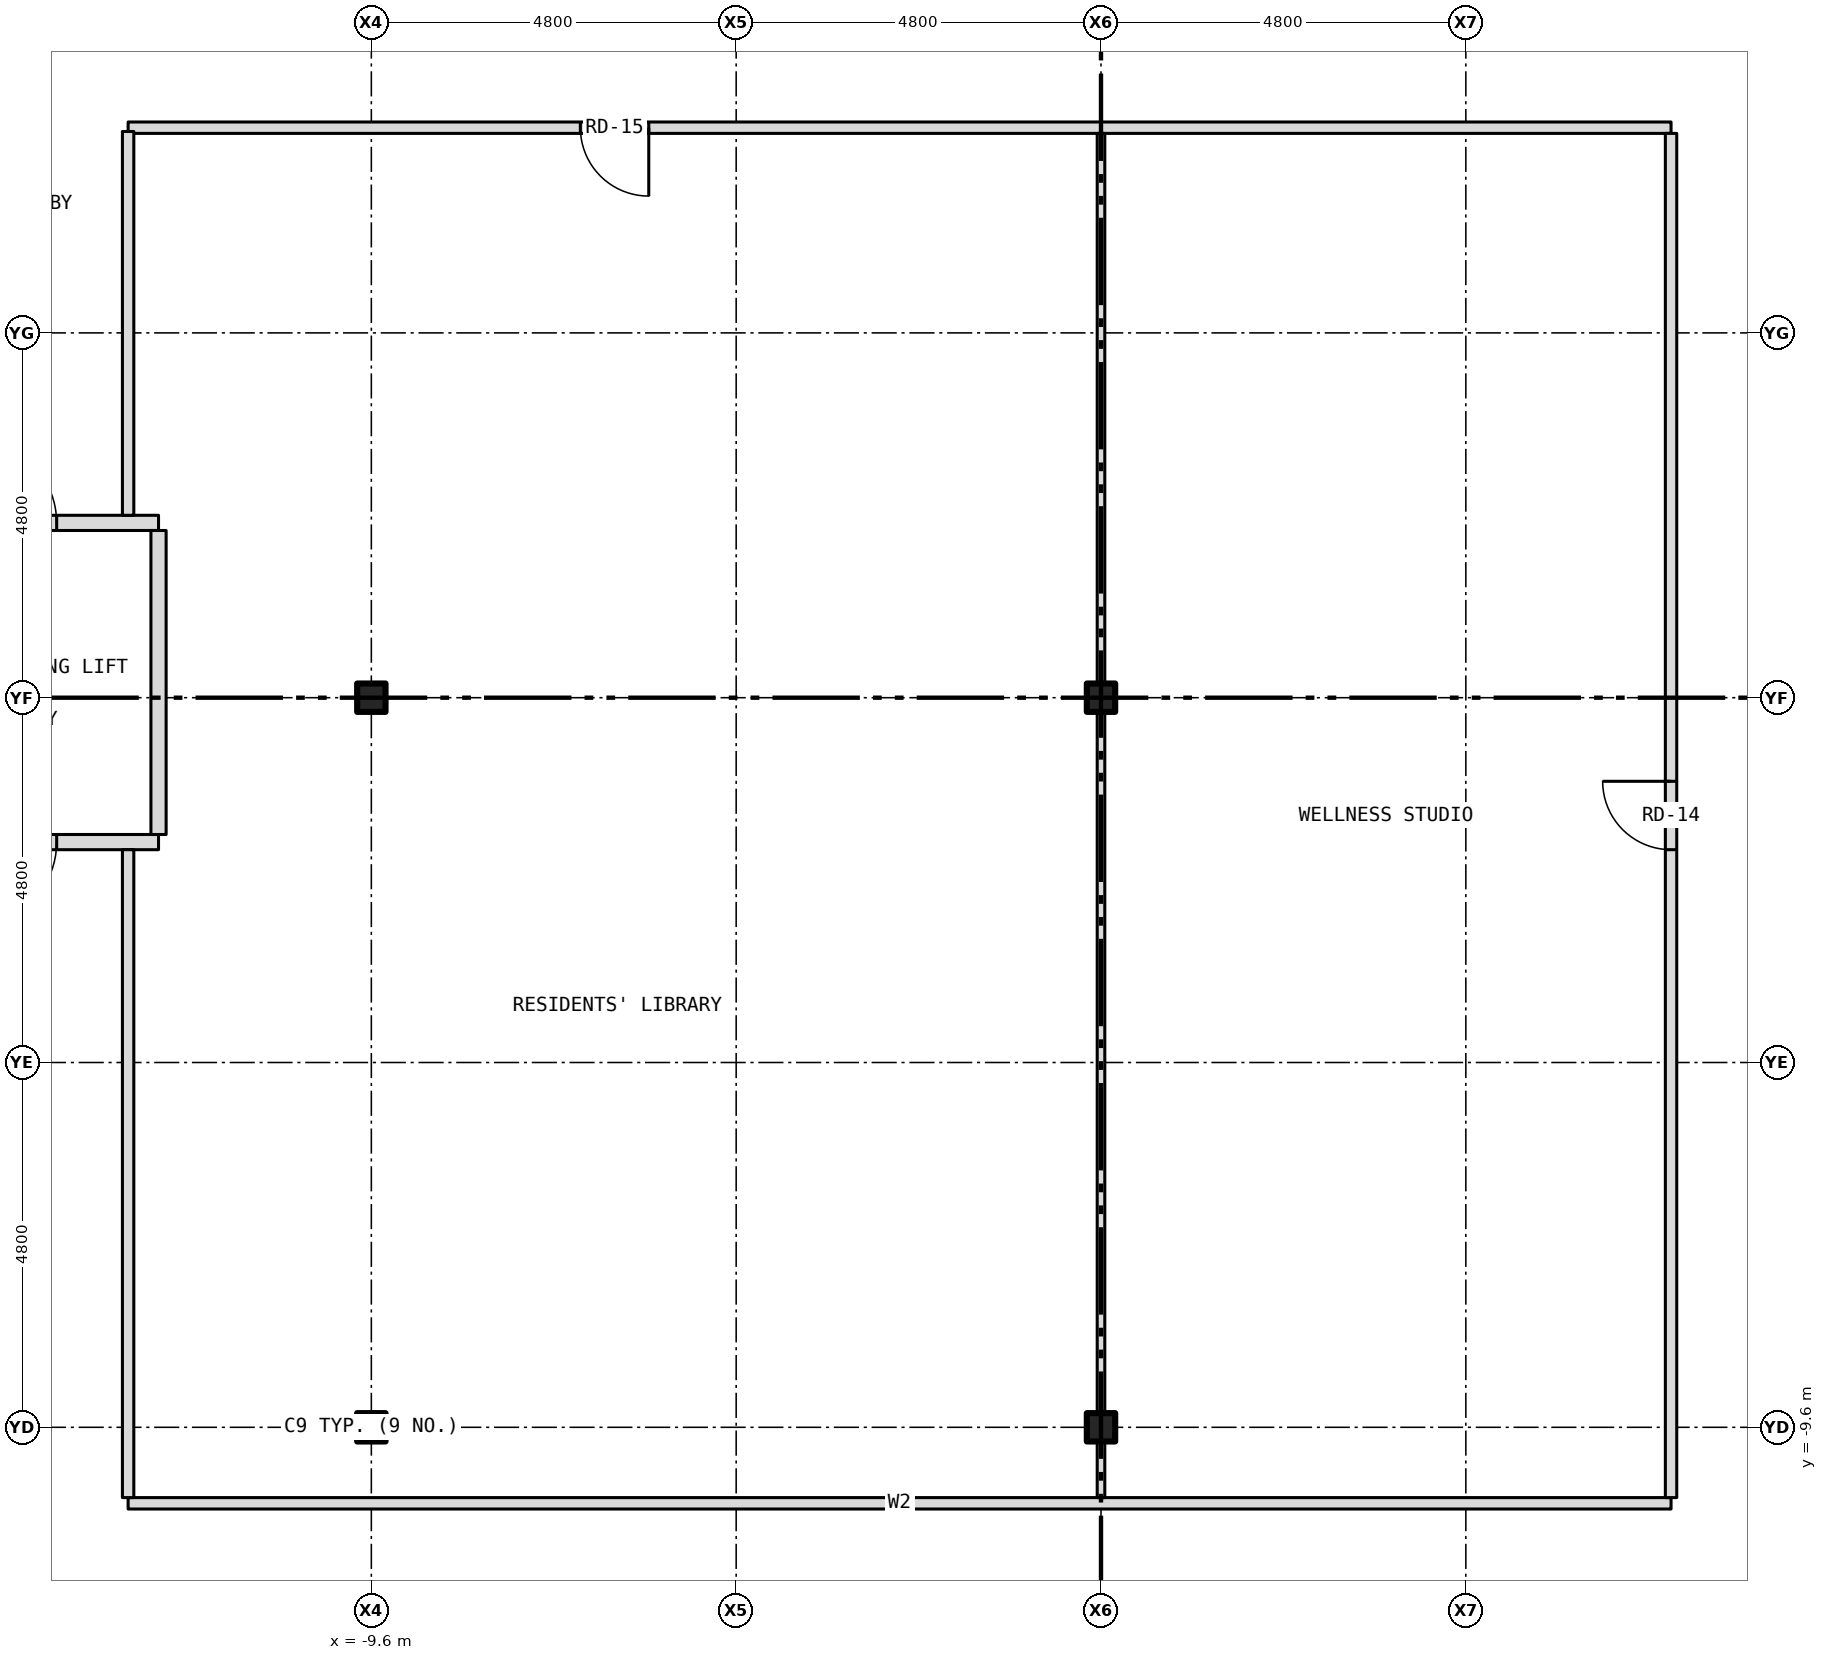
"""IFC4 building model, lengths in metres.
Left out: names, types, materials, properties, quantities, classifications, styles, units other than length and angle.
Written with IfcOpenShell. Run it as: python <this file> out.ifc"""

import sys

from ifc_helpers import new_model, si_unit, direction, frame, frame_2d, origin, origin_2d, place, context, subcontext, project, spatial, rectangle, i_section, extrude, element, fill, save


model = new_model("IFC4")
c1 = context("Model", 3, precision=1e-05, world=origin(), true_north=direction((0.0, 1.0)))
c2 = subcontext(c1, "Body", "Model", "MODEL_VIEW")
j1 = project(units=[si_unit("LENGTHUNIT", "METRE"), si_unit("PLANEANGLEUNIT", "RADIAN")], contexts=[c1])
p1 = place(None, origin())
s1 = spatial("IfcSite", under=j1, at=p1, CompositionType="ELEMENT")
p2 = place(p1, origin())
s2 = spatial("IfcBuilding", under=s1, at=p2, CompositionType="ELEMENT")
p3 = place(p2, frame((0.0, 0.0, 194.5)))
s3 = spatial("IfcBuildingStorey", under=s2, at=p3, CompositionType="ELEMENT", Elevation=194.5)
for number, where, z_axis, x_axis in (
    (1, (-9.6, -9.6, -0.15), (0.0, 0.0, 1.0), (1.0, 0.0, 0.0)),
    (2, (-9.6, 0.0, -0.15), (0.0, 0.0, 1.0), (1.0, 0.0, 0.0)),
    (3, (0.0, -9.6, -0.15), (0.0, 0.0, 1.0), (1.0, 0.0, 0.0)),
    (4, (0.0, 0.0, -0.15), (0.0, 0.0, 1.0), (1.0, 0.0, 0.0)),
):
    element("IfcColumn", number, at=place(p3, frame(where, z_axis=z_axis, x_axis=x_axis)), inside=s3, PredefinedType="COLUMN", context=c2, shape_type="SweptSolid", body=[
        extrude(i_section(OverallWidth=0.373, OverallDepth=0.373, WebThickness=0.016, FlangeThickness=0.026, at=origin_2d()), origin(), (0.0, 0.0, 1.0), 3.5),
    ])
p4 = place(p3, frame((-12.8, -10.6, 0.0), z_axis=(0.0, 0.0, 1.0), x_axis=(1.0, 0.0, 0.0)))
e5 = element("IfcWall", 5, at=p4, inside=s3, PredefinedType="PARTITIONING", context=c2, shape_type="SweptSolid", body=[
    extrude(rectangle(XDim=20.3, YDim=0.15, at=frame_2d((10.15, 0.0))), origin(), (0.0, 0.0, 1.0), 3.35),
])
p5 = place(p3, frame((-15.68, -1.9, 0.0), z_axis=(0.0, 0.0, 1.0), x_axis=(1.0, 0.0, 0.0)))
e6 = element("IfcWall", 6, at=p5, inside=s3, PredefinedType="PARTITIONING", context=c2, shape_type="SweptSolid", body=[
    extrude(rectangle(XDim=3.28, YDim=0.2, at=frame_2d((1.64, 0.0))), origin(), (0.0, 0.0, 1.0), 3.35),
])
p6 = place(p5, frame((0.84, 0.0, 0.0)))
e7 = element("IfcOpeningElement", 7, at=p6, cuts=e6, PredefinedType="OPENING", context=c2, shape_type="SweptSolid", body=[
    extrude(rectangle(XDim=1.1, YDim=2.1, at=frame_2d((0.55, 1.05))), frame((0.0, 0.112, 0.0), z_axis=(0.0, -1.0, 0.0), x_axis=(1.0, 0.0, 0.0)), (0.0, 0.0, 1.0), 0.224),
])
p7 = place(p3, frame((-15.68, 2.3, 0.0), z_axis=(0.0, 0.0, 1.0), x_axis=(1.0, 0.0, 0.0)))
e8 = element("IfcWall", 8, at=p7, inside=s3, PredefinedType="PARTITIONING", context=c2, shape_type="SweptSolid", body=[
    extrude(rectangle(XDim=3.28, YDim=0.2, at=frame_2d((1.64, 0.0))), origin(), (0.0, 0.0, 1.0), 3.35),
])
p8 = place(p7, frame((0.84, 0.0, 0.0)))
e9 = element("IfcOpeningElement", 9, at=p8, cuts=e8, PredefinedType="OPENING", context=c2, shape_type="SweptSolid", body=[
    extrude(rectangle(XDim=1.1, YDim=2.1, at=frame_2d((0.55, 1.05))), frame((0.0, 0.112, 0.0), z_axis=(0.0, -1.0, 0.0), x_axis=(1.0, 0.0, 0.0)), (0.0, 0.0, 1.0), 0.224),
])
p9 = place(p3, frame((-12.8, 7.5, 0.0), z_axis=(0.0, 0.0, 1.0), x_axis=(1.0, 0.0, 0.0)))
e10 = element("IfcWall", 10, at=p9, inside=s3, PredefinedType="PARTITIONING", context=c2, shape_type="SweptSolid", body=[
    extrude(rectangle(XDim=20.3, YDim=0.15, at=frame_2d((10.15, 0.0))), origin(), (0.0, 0.0, 1.0), 3.35),
])
p10 = place(p9, frame((5.95, 0.0, 0.0)))
e11 = element("IfcOpeningElement", 11, at=p10, cuts=e10, PredefinedType="OPENING", context=c2, shape_type="SweptSolid", body=[
    extrude(rectangle(XDim=0.9, YDim=2.1, at=frame_2d((0.45, 1.05))), frame((0.0, 0.087, 0.0), z_axis=(0.0, -1.0, 0.0), x_axis=(1.0, 0.0, 0.0)), (0.0, 0.0, 1.0), 0.174),
])
p11 = place(p3, frame((-12.8, -10.525, 0.0), z_axis=(0.0, 0.0, 1.0), x_axis=(0.0, 1.0, 0.0)))
e12 = element("IfcWall", 12, at=p11, inside=s3, PredefinedType="PARTITIONING", context=c2, shape_type="SweptSolid", body=[
    extrude(rectangle(XDim=8.525, YDim=0.15, at=frame_2d((4.262, 0.0))), origin(), (0.0, 0.0, 1.0), 3.35),
])
p12 = place(p3, frame((-12.8, 2.4, 0.0), z_axis=(0.0, 0.0, 1.0), x_axis=(0.0, 1.0, 0.0)))
e13 = element("IfcWall", 13, at=p12, inside=s3, PredefinedType="PARTITIONING", context=c2, shape_type="SweptSolid", body=[
    extrude(rectangle(XDim=5.05, YDim=0.15, at=frame_2d((2.525, 0.0))), origin(), (0.0, 0.0, 1.0), 3.35),
])
p13 = place(p3, frame((-12.4, -1.8, 0.0), z_axis=(0.0, 0.0, 1.0), x_axis=(0.0, 1.0, 0.0)))
e14 = element("IfcWall", 14, at=p13, inside=s3, PredefinedType="PARTITIONING", context=c2, shape_type="SweptSolid", body=[
    extrude(rectangle(XDim=4.0, YDim=0.2, at=frame_2d((2.0, 0.0))), origin(), (0.0, 0.0, 1.0), 3.35),
])
p14 = place(p3, frame((0.0, -10.525, 0.0), z_axis=(0.0, 0.0, 1.0), x_axis=(0.0, 1.0, 0.0)))
e15 = element("IfcWall", 15, at=p14, inside=s3, PredefinedType="PARTITIONING", context=c2, shape_type="SweptSolid", body=[
    extrude(rectangle(XDim=0.738, YDim=0.1, at=frame_2d((0.369, 0.0))), origin(), (0.0, 0.0, 1.0), 2.728),
])
p15 = place(p3, frame((0.0, -9.787, 0.0), z_axis=(0.0, 0.0, 1.0), x_axis=(0.0, 1.0, 0.0)))
e16 = element("IfcWall", 16, at=p15, inside=s3, PredefinedType="PARTITIONING", context=c2, shape_type="SweptSolid", body=[
    extrude(rectangle(XDim=0.374, YDim=0.1, at=frame_2d((0.187, 0.0))), origin(), (0.0, 0.0, 1.0), 3.35),
])
p16 = place(p3, frame((0.0, -9.413, 0.0), z_axis=(0.0, 0.0, 1.0), x_axis=(0.0, 1.0, 0.0)))
e17 = element("IfcWall", 17, at=p16, inside=s3, PredefinedType="PARTITIONING", context=c2, shape_type="SweptSolid", body=[
    extrude(rectangle(XDim=9.226, YDim=0.1, at=frame_2d((4.613, 0.0))), origin(), (0.0, 0.0, 1.0), 2.728),
])
p17 = place(p3, frame((0.0, -0.187, 0.0), z_axis=(0.0, 0.0, 1.0), x_axis=(0.0, 1.0, 0.0)))
e18 = element("IfcWall", 18, at=p17, inside=s3, PredefinedType="PARTITIONING", context=c2, shape_type="SweptSolid", body=[
    extrude(rectangle(XDim=0.374, YDim=0.1, at=frame_2d((0.187, 0.0))), origin(), (0.0, 0.0, 1.0), 3.35),
])
p18 = place(p3, frame((0.0, 0.187, 0.0), z_axis=(0.0, 0.0, 1.0), x_axis=(0.0, 1.0, 0.0)))
e19 = element("IfcWall", 19, at=p18, inside=s3, PredefinedType="PARTITIONING", context=c2, shape_type="SweptSolid", body=[
    extrude(rectangle(XDim=7.238, YDim=0.1, at=frame_2d((3.619, 0.0))), origin(), (0.0, 0.0, 1.0), 2.728),
])
p19 = place(p3, frame((7.5, -10.525, 0.0), z_axis=(0.0, 0.0, 1.0), x_axis=(0.0, 1.0, 0.0)))
e20 = element("IfcWall", 20, at=p19, inside=s3, PredefinedType="PARTITIONING", context=c2, shape_type="SweptSolid", body=[
    extrude(rectangle(XDim=17.95, YDim=0.15, at=frame_2d((8.975, 0.0))), origin(), (0.0, 0.0, 1.0), 3.35),
])
p20 = place(p19, frame((8.525, 0.0, 0.0)))
e21 = element("IfcOpeningElement", 21, at=p20, cuts=e20, PredefinedType="OPENING", context=c2, shape_type="SweptSolid", body=[
    extrude(rectangle(XDim=0.9, YDim=2.1, at=frame_2d((0.45, 1.05))), frame((0.0, 0.087, 0.0), z_axis=(0.0, -1.0, 0.0), x_axis=(1.0, 0.0, 0.0)), (0.0, 0.0, 1.0), 0.174),
])
p21 = place(p8, origin())
e22 = element("IfcDoor", 22, at=p21, inside=s3, OperationType="SINGLE_SWING_LEFT", PredefinedType="DOOR", context=c2, shape_type="SweptSolid", body=[
    extrude(rectangle(XDim=1.1, YDim=2.1, at=frame_2d((0.55, 1.05))), frame((0.0, 0.025, 0.0), z_axis=(0.0, -1.0, 0.0), x_axis=(1.0, 0.0, 0.0)), (0.0, 0.0, 1.0), 0.05),
])
fill(e9, e22)
p22 = place(p6, origin())
e23 = element("IfcDoor", 23, at=p22, inside=s3, OperationType="SINGLE_SWING_LEFT", PredefinedType="DOOR", context=c2, shape_type="SweptSolid", body=[
    extrude(rectangle(XDim=1.1, YDim=2.1, at=frame_2d((0.55, 1.05))), frame((0.0, 0.025, 0.0), z_axis=(0.0, -1.0, 0.0), x_axis=(1.0, 0.0, 0.0)), (0.0, 0.0, 1.0), 0.05),
])
fill(e7, e23)
p23 = place(p20, origin())
e24 = element("IfcDoor", 24, at=p23, inside=s3, OperationType="SINGLE_SWING_RIGHT", PredefinedType="DOOR", context=c2, shape_type="SweptSolid", body=[
    extrude(rectangle(XDim=0.9, YDim=2.1, at=frame_2d((0.45, 1.05))), frame((0.0, 0.025, 0.0), z_axis=(0.0, -1.0, 0.0), x_axis=(1.0, 0.0, 0.0)), (0.0, 0.0, 1.0), 0.05),
])
fill(e21, e24)
p24 = place(p10, origin())
e25 = element("IfcDoor", 25, at=p24, inside=s3, OperationType="SINGLE_SWING_RIGHT", PredefinedType="DOOR", context=c2, shape_type="SweptSolid", body=[
    extrude(rectangle(XDim=0.9, YDim=2.1, at=frame_2d((0.45, 1.05))), frame((0.0, 0.025, 0.0), z_axis=(0.0, -1.0, 0.0), x_axis=(1.0, 0.0, 0.0)), (0.0, 0.0, 1.0), 0.05),
])
fill(e11, e25)
save(model, sys.argv[1])
